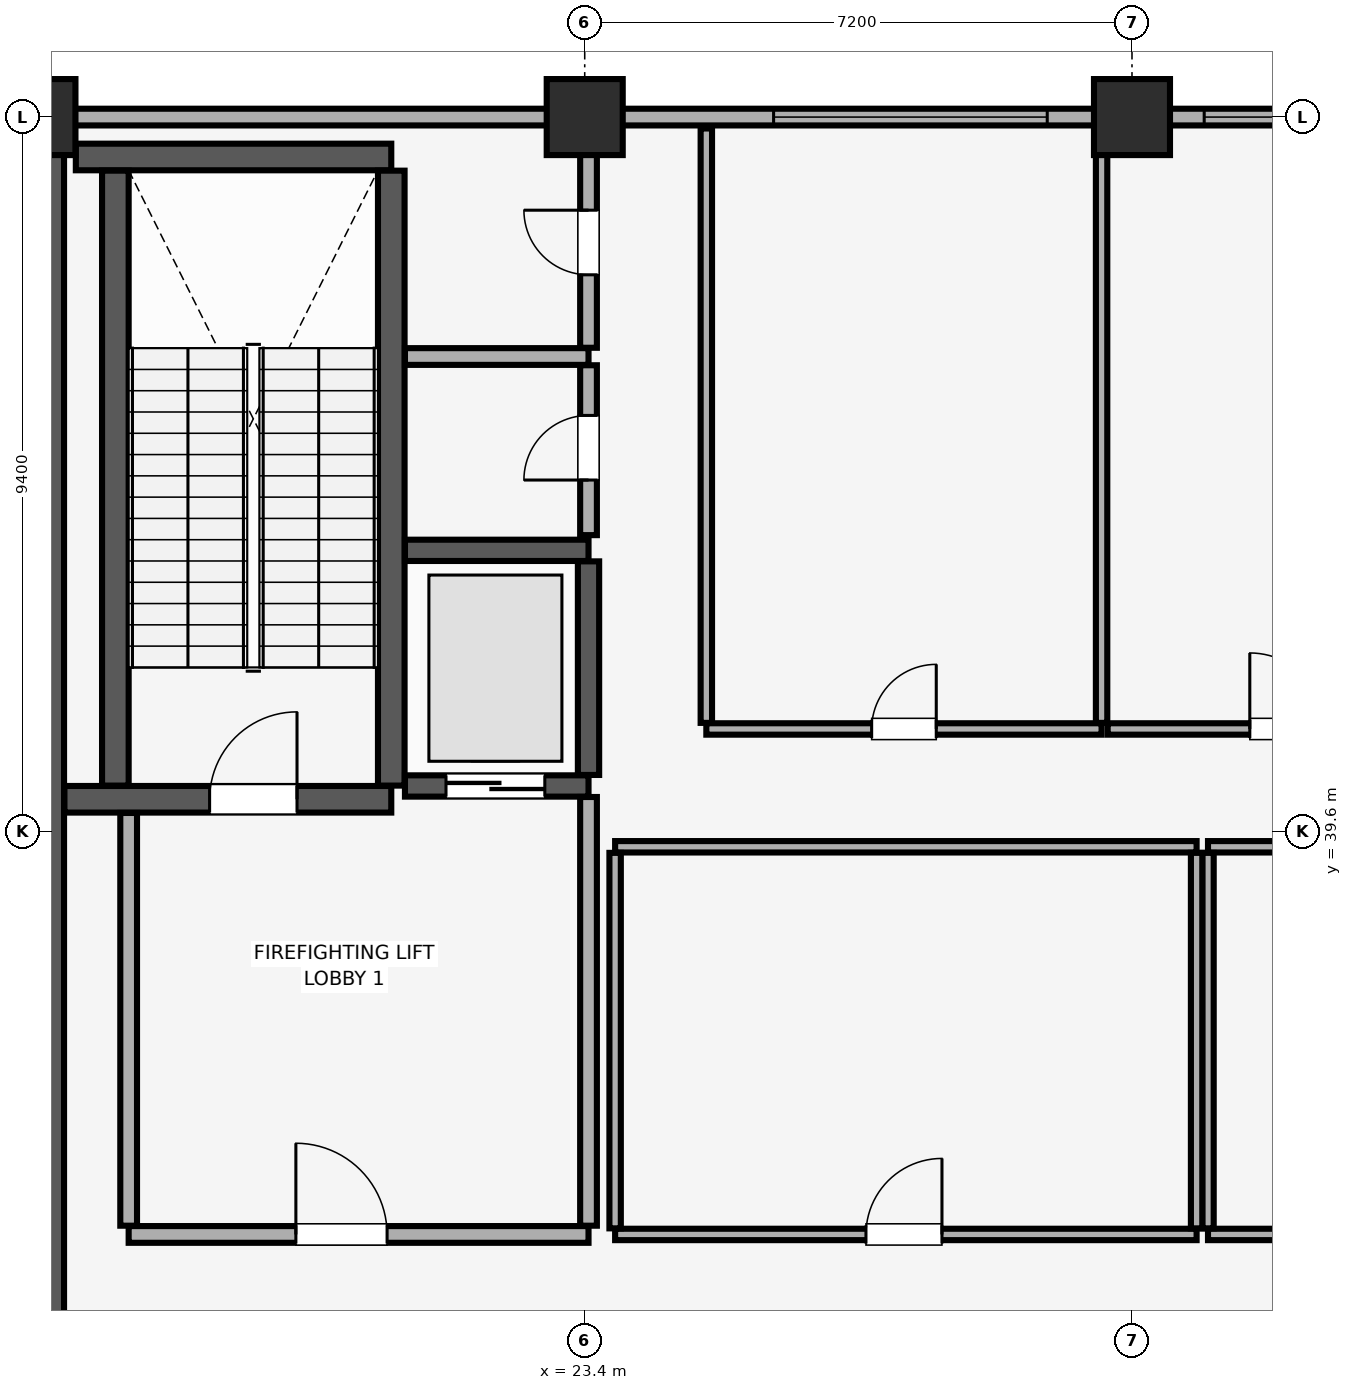
"""IFC4 building model, lengths in metres.
Left out: names, types, materials, properties, quantities, classifications, styles, units other than length and angle.
Written with IfcOpenShell. Run it as: python <this file> out.ifc"""

import sys

from ifc_helpers import new_model, si_unit, direction, frame, frame_2d, origin, origin_2d, place, context, subcontext, project, spatial, rectangle, extrude, element, fill, save


model = new_model("IFC4")
c1 = context("Model", 3, precision=1e-05, world=origin(), true_north=direction((0.0, 1.0)))
c2 = subcontext(c1, "Body", "Model", "MODEL_VIEW")
j1 = project(units=[si_unit("LENGTHUNIT", "METRE"), si_unit("PLANEANGLEUNIT", "RADIAN")], contexts=[c1])
p1 = place(None, origin())
s1 = spatial("IfcSite", under=j1, at=p1, CompositionType="ELEMENT")
p2 = place(p1, origin())
s2 = spatial("IfcBuilding", under=s1, at=p2, CompositionType="ELEMENT")
p3 = place(p2, frame((0.0, 0.0, 300.2)))
s3 = spatial("IfcBuildingStorey", under=s2, at=p3, CompositionType="ELEMENT", Elevation=300.2)
for number, where, z_axis, x_axis in (
    (1, (16.2, 49.0, 0.0), (0.0, 0.0, 1.0), (1.0, 0.0, 0.0)),
    (2, (23.4, 49.0, 0.0), (0.0, 0.0, 1.0), (1.0, 0.0, 0.0)),
    (3, (30.6, 49.0, 0.0), (0.0, 0.0, 1.0), (1.0, 0.0, 0.0)),
):
    element("IfcColumn", number, at=place(p3, frame(where, z_axis=z_axis, x_axis=x_axis)), inside=s3, PredefinedType="COLUMN", context=c2, shape_type="SweptSolid", body=[
        extrude(rectangle(XDim=1.0, YDim=1.0, at=origin_2d()), origin(), (0.0, 0.0, 1.0), 5.12),
    ])
p4 = place(p3, frame((71.4, 49.0, 0.0), z_axis=(0.0, 0.0, 1.0), x_axis=(-1.0, 0.0, 0.0)))
e4 = element("IfcWall", 4, at=p4, inside=s3, PredefinedType="SOLIDWALL", context=c2, shape_type="SweptSolid", body=[
    extrude(rectangle(XDim=58.8, YDim=0.22, at=frame_2d((29.4, 0.0))), origin(), (0.0, 0.0, 1.0), 4.32),
])
p5 = place(p4, frame((56.365, 0.0, 0.85)))
e5 = element("IfcOpeningElement", 5, at=p5, cuts=e4, PredefinedType="OPENING", context=c2, shape_type="SweptSolid", body=[
    extrude(rectangle(XDim=1.5, YDim=1.4, at=frame_2d((0.75, 0.7))), frame((0.0, 0.12, 0.0), z_axis=(0.0, -1.0, 0.0), x_axis=(1.0, 0.0, 0.0)), (0.0, 0.0, 1.0), 0.24),
])
p6 = place(p4, frame((0.935, 0.0, 0.85)))
e6 = element("IfcOpeningElement", 6, at=p6, cuts=e4, PredefinedType="OPENING", context=c2, shape_type="SweptSolid", body=[
    extrude(rectangle(XDim=1.5, YDim=1.4, at=frame_2d((0.75, 0.7))), frame((0.0, 0.12, 0.0), z_axis=(0.0, -1.0, 0.0), x_axis=(1.0, 0.0, 0.0)), (0.0, 0.0, 1.0), 0.24),
])
p7 = place(p4, frame((41.915, 0.0, 0.9)))
e7 = element("IfcOpeningElement", 7, at=p7, cuts=e4, PredefinedType="OPENING", context=c2, shape_type="SweptSolid", body=[
    extrude(rectangle(XDim=3.6, YDim=1.5, at=frame_2d((1.8, 0.75))), frame((0.0, 0.12, 0.0), z_axis=(0.0, -1.0, 0.0), x_axis=(1.0, 0.0, 0.0)), (0.0, 0.0, 1.0), 0.24),
])
p8 = place(p4, frame((36.85, 0.0, 0.9)))
e8 = element("IfcOpeningElement", 8, at=p8, cuts=e4, PredefinedType="OPENING", context=c2, shape_type="SweptSolid", body=[
    extrude(rectangle(XDim=3.0, YDim=1.5, at=frame_2d((1.5, 0.75))), frame((0.0, 0.12, 0.0), z_axis=(0.0, -1.0, 0.0), x_axis=(1.0, 0.0, 0.0)), (0.0, 0.0, 1.0), 0.24),
])
p9 = place(p4, frame((19.7, 0.0, 0.9)))
e9 = element("IfcOpeningElement", 9, at=p9, cuts=e4, PredefinedType="OPENING", context=c2, shape_type="SweptSolid", body=[
    extrude(rectangle(XDim=3.6, YDim=1.5, at=frame_2d((1.8, 0.75))), frame((0.0, 0.12, 0.0), z_axis=(0.0, -1.0, 0.0), x_axis=(1.0, 0.0, 0.0)), (0.0, 0.0, 1.0), 0.24),
])
p10 = place(p4, frame((14.635, 0.0, 0.9)))
e10 = element("IfcOpeningElement", 10, at=p10, cuts=e4, PredefinedType="OPENING", context=c2, shape_type="SweptSolid", body=[
    extrude(rectangle(XDim=2.4, YDim=1.5, at=frame_2d((1.2, 0.75))), frame((0.0, 0.12, 0.0), z_axis=(0.0, -1.0, 0.0), x_axis=(1.0, 0.0, 0.0)), (0.0, 0.0, 1.0), 0.24),
])
p11 = place(p3, frame((16.2, 29.4, 0.0), z_axis=(0.0, 0.0, 1.0), x_axis=(0.0, 1.0, 0.0)))
e11 = element("IfcWall", 11, at=p11, inside=s3, PredefinedType="SHEAR", context=c2, shape_type="SweptSolid", body=[
    extrude(rectangle(XDim=19.2, YDim=0.7, at=frame_2d((9.6, 0.0))), origin(), (0.0, 0.0, 1.0), 5.12),
])
p12 = place(p3, frame((16.555, 40.025, 0.0), z_axis=(0.0, 0.0, 1.0), x_axis=(1.0, 0.0, 0.0)))
e12 = element("IfcWall", 12, at=p12, inside=s3, PredefinedType="SHEAR", context=c2, shape_type="SweptSolid", body=[
    extrude(rectangle(XDim=4.3, YDim=0.35, at=frame_2d((2.15, 0.0))), origin(), (0.0, 0.0, 1.0), 5.12),
])
p13 = place(p12, frame((1.91, 0.0, 0.0)))
e13 = element("IfcOpeningElement", 13, at=p13, cuts=e12, PredefinedType="OPENING", context=c2, shape_type="SweptSolid", body=[
    extrude(rectangle(XDim=1.15, YDim=2.15, at=frame_2d((0.575, 1.075))), frame((0.0, 0.185, 0.0), z_axis=(0.0, -1.0, 0.0), x_axis=(1.0, 0.0, 0.0)), (0.0, 0.0, 1.0), 0.37),
])
p14 = place(p3, frame((16.705, 48.475, 0.0), z_axis=(0.0, 0.0, 1.0), x_axis=(1.0, 0.0, 0.0)))
e14 = element("IfcWall", 14, at=p14, inside=s3, PredefinedType="SHEAR", context=c2, shape_type="SweptSolid", body=[
    extrude(rectangle(XDim=4.15, YDim=0.35, at=frame_2d((2.075, 0.0))), origin(), (0.0, 0.0, 1.0), 5.12),
])
for number, where, z_axis, x_axis in (
    (15, (17.225, 40.205, 0.0), (0.0, 0.0, 1.0), (0.0, 1.0, 0.0)),
    (16, (20.855, 40.205, 0.0), (0.0, 0.0, 1.0), (0.0, 1.0, 0.0)),
):
    element("IfcWall", number, at=place(p3, frame(where, z_axis=z_axis, x_axis=x_axis)), inside=s3, PredefinedType="SHEAR", context=c2, shape_type="SweptSolid", body=[
        extrude(rectangle(XDim=8.09, YDim=0.35, at=frame_2d((4.045, 0.0))), origin(), (0.0, 0.0, 1.0), 5.12),
    ])
p15 = place(p3, frame((21.035, 40.2, 0.0), z_axis=(0.0, 0.0, 1.0), x_axis=(1.0, 0.0, 0.0)))
e17 = element("IfcWall", 17, at=p15, inside=s3, PredefinedType="SHEAR", context=c2, shape_type="SweptSolid", body=[
    extrude(rectangle(XDim=2.415, YDim=0.28, at=frame_2d((1.208, 0.0))), origin(), (0.0, 0.0, 1.0), 5.12),
])
p16 = place(p15, frame((0.54, 0.0, 0.0)))
e18 = element("IfcOpeningElement", 18, at=p16, cuts=e17, PredefinedType="OPENING", context=c2, shape_type="SweptSolid", body=[
    extrude(rectangle(XDim=1.3, YDim=2.3, at=frame_2d((0.65, 1.15))), frame((0.0, 0.15, 0.0), z_axis=(0.0, -1.0, 0.0), x_axis=(1.0, 0.0, 0.0)), (0.0, 0.0, 1.0), 0.3),
])
p17 = place(p3, frame((21.035, 43.3, 0.0), z_axis=(0.0, 0.0, 1.0), x_axis=(1.0, 0.0, 0.0)))
e19 = element("IfcWall", 19, at=p17, inside=s3, PredefinedType="SHEAR", context=c2, shape_type="SweptSolid", body=[
    extrude(rectangle(XDim=2.415, YDim=0.28, at=frame_2d((1.208, 0.0))), origin(), (0.0, 0.0, 1.0), 5.12),
])
p18 = place(p3, frame((23.45, 40.345, 0.0), z_axis=(0.0, 0.0, 1.0), x_axis=(0.0, 1.0, 0.0)))
e20 = element("IfcWall", 20, at=p18, inside=s3, PredefinedType="SHEAR", context=c2, shape_type="SweptSolid", body=[
    extrude(rectangle(XDim=2.81, YDim=0.28, at=frame_2d((1.405, 0.0))), origin(), (0.0, 0.0, 1.0), 5.12),
])
p19 = place(p3, frame((17.4, 34.3, 0.0), z_axis=(0.0, 0.0, 1.0), x_axis=(1.0, 0.0, 0.0)))
e21 = element("IfcWall", 21, at=p19, inside=s3, PredefinedType="PARTITIONING", context=c2, shape_type="SweptSolid", body=[
    extrude(rectangle(XDim=6.05, YDim=0.22, at=frame_2d((3.025, 0.0))), origin(), (0.0, 0.0, 1.0), 5.12),
])
p20 = place(p19, frame((2.2, 0.0, 0.0)))
e22 = element("IfcOpeningElement", 22, at=p20, cuts=e21, PredefinedType="OPENING", context=c2, shape_type="SweptSolid", body=[
    extrude(rectangle(XDim=1.2, YDim=2.15, at=frame_2d((0.6, 1.075))), frame((0.0, 0.12, 0.0), z_axis=(0.0, -1.0, 0.0), x_axis=(1.0, 0.0, 0.0)), (0.0, 0.0, 1.0), 0.24),
])
p21 = place(p3, frame((17.4, 34.415, 0.0), z_axis=(0.0, 0.0, 1.0), x_axis=(0.0, 1.0, 0.0)))
e23 = element("IfcWall", 23, at=p21, inside=s3, PredefinedType="PARTITIONING", context=c2, shape_type="SweptSolid", body=[
    extrude(rectangle(XDim=5.43, YDim=0.22, at=frame_2d((2.715, 0.0))), origin(), (0.0, 0.0, 1.0), 5.12),
])
p22 = place(p3, frame((23.45, 34.415, 0.0), z_axis=(0.0, 0.0, 1.0), x_axis=(0.0, 1.0, 0.0)))
e24 = element("IfcWall", 24, at=p22, inside=s3, PredefinedType="PARTITIONING", context=c2, shape_type="SweptSolid", body=[
    extrude(rectangle(XDim=5.64, YDim=0.22, at=frame_2d((2.82, 0.0))), origin(), (0.0, 0.0, 1.0), 5.12),
])
p23 = place(p3, frame((21.035, 45.85, 0.0), z_axis=(0.0, 0.0, 1.0), x_axis=(1.0, 0.0, 0.0)))
e25 = element("IfcWall", 25, at=p23, inside=s3, PredefinedType="PARTITIONING", context=c2, shape_type="SweptSolid", body=[
    extrude(rectangle(XDim=2.415, YDim=0.22, at=frame_2d((1.208, 0.0))), origin(), (0.0, 0.0, 1.0), 5.12),
])
p24 = place(p3, frame((23.45, 43.5, 0.0), z_axis=(0.0, 0.0, 1.0), x_axis=(0.0, 1.0, 0.0)))
e26 = element("IfcWall", 26, at=p24, inside=s3, PredefinedType="PARTITIONING", context=c2, shape_type="SweptSolid", body=[
    extrude(rectangle(XDim=2.235, YDim=0.22, at=frame_2d((1.118, 0.0))), origin(), (0.0, 0.0, 1.0), 5.12),
])
p25 = place(p24, frame((0.725, 0.0, 0.0)))
e27 = element("IfcOpeningElement", 27, at=p25, cuts=e26, PredefinedType="OPENING", context=c2, shape_type="SweptSolid", body=[
    extrude(rectangle(XDim=0.85, YDim=2.1, at=frame_2d((0.425, 1.05))), frame((0.0, 0.12, 0.0), z_axis=(0.0, -1.0, 0.0), x_axis=(1.0, 0.0, 0.0)), (0.0, 0.0, 1.0), 0.24),
])
p26 = place(p3, frame((23.45, 45.965, 0.0), z_axis=(0.0, 0.0, 1.0), x_axis=(0.0, 1.0, 0.0)))
e28 = element("IfcWall", 28, at=p26, inside=s3, PredefinedType="PARTITIONING", context=c2, shape_type="SweptSolid", body=[
    extrude(rectangle(XDim=2.885, YDim=0.22, at=frame_2d((1.442, 0.0))), origin(), (0.0, 0.0, 1.0), 5.12),
])
p27 = place(p26, frame((0.96, 0.0, 0.0)))
e29 = element("IfcOpeningElement", 29, at=p27, cuts=e28, PredefinedType="OPENING", context=c2, shape_type="SweptSolid", body=[
    extrude(rectangle(XDim=0.85, YDim=2.1, at=frame_2d((0.425, 1.05))), frame((0.0, 0.12, 0.0), z_axis=(0.0, -1.0, 0.0), x_axis=(1.0, 0.0, 0.0)), (0.0, 0.0, 1.0), 0.24),
])
p28 = place(p3, frame((31.6, 34.3, 0.0), z_axis=(0.0, 0.0, 1.0), x_axis=(1.0, 0.0, 0.0)))
e30 = element("IfcWall", 30, at=p28, inside=s3, PredefinedType="PARTITIONING", context=c2, shape_type="SweptSolid", body=[
    extrude(rectangle(XDim=5.2, YDim=0.15, at=frame_2d((2.6, 0.0))), origin(), (0.0, 0.0, 1.0), 5.12),
])
p29 = place(p28, frame((2.175, 0.0, 0.0)))
e31 = element("IfcOpeningElement", 31, at=p29, cuts=e30, PredefinedType="OPENING", context=c2, shape_type="SweptSolid", body=[
    extrude(rectangle(XDim=0.85, YDim=2.1, at=frame_2d((0.425, 1.05))), frame((0.0, 0.085, 0.0), z_axis=(0.0, -1.0, 0.0), x_axis=(1.0, 0.0, 0.0)), (0.0, 0.0, 1.0), 0.17),
])
p30 = place(p3, frame((31.6, 39.4, 0.0), z_axis=(0.0, 0.0, 1.0), x_axis=(1.0, 0.0, 0.0)))
e32 = element("IfcWall", 32, at=p30, inside=s3, PredefinedType="PARTITIONING", context=c2, shape_type="SweptSolid", body=[
    extrude(rectangle(XDim=5.2, YDim=0.15, at=frame_2d((2.6, 0.0))), origin(), (0.0, 0.0, 1.0), 5.12),
])
p31 = place(p3, frame((31.6, 34.38, 0.0), z_axis=(0.0, 0.0, 1.0), x_axis=(0.0, 1.0, 0.0)))
e33 = element("IfcWall", 33, at=p31, inside=s3, PredefinedType="PARTITIONING", context=c2, shape_type="SweptSolid", body=[
    extrude(rectangle(XDim=4.94, YDim=0.15, at=frame_2d((2.47, 0.0))), origin(), (0.0, 0.0, 1.0), 5.12),
])
p32 = place(p3, frame((23.8, 34.3, 0.0), z_axis=(0.0, 0.0, 1.0), x_axis=(1.0, 0.0, 0.0)))
e34 = element("IfcWall", 34, at=p32, inside=s3, PredefinedType="PARTITIONING", context=c2, shape_type="SweptSolid", body=[
    extrude(rectangle(XDim=7.65, YDim=0.15, at=frame_2d((3.825, 0.0))), origin(), (0.0, 0.0, 1.0), 5.12),
])
p33 = place(p32, frame((3.3, 0.0, 0.0)))
e35 = element("IfcOpeningElement", 35, at=p33, cuts=e34, PredefinedType="OPENING", context=c2, shape_type="SweptSolid", body=[
    extrude(rectangle(XDim=1.0, YDim=2.15, at=frame_2d((0.5, 1.075))), frame((0.0, 0.085, 0.0), z_axis=(0.0, -1.0, 0.0), x_axis=(1.0, 0.0, 0.0)), (0.0, 0.0, 1.0), 0.17),
])
p34 = place(p3, frame((23.8, 39.4, 0.0), z_axis=(0.0, 0.0, 1.0), x_axis=(1.0, 0.0, 0.0)))
e36 = element("IfcWall", 36, at=p34, inside=s3, PredefinedType="PARTITIONING", context=c2, shape_type="SweptSolid", body=[
    extrude(rectangle(XDim=7.65, YDim=0.15, at=frame_2d((3.825, 0.0))), origin(), (0.0, 0.0, 1.0), 5.12),
])
for number, where, z_axis, x_axis in (
    (37, (23.8, 34.38, 0.0), (0.0, 0.0, 1.0), (0.0, 1.0, 0.0)),
    (38, (31.45, 34.38, 0.0), (0.0, 0.0, 1.0), (0.0, 1.0, 0.0)),
):
    element("IfcWall", number, at=place(p3, frame(where, z_axis=z_axis, x_axis=x_axis)), inside=s3, PredefinedType="PARTITIONING", context=c2, shape_type="SweptSolid", body=[
        extrude(rectangle(XDim=4.94, YDim=0.15, at=frame_2d((2.47, 0.0))), origin(), (0.0, 0.0, 1.0), 5.12),
    ])
p35 = place(p3, frame((25.0, 40.95, 0.0), z_axis=(0.0, 0.0, 1.0), x_axis=(1.0, 0.0, 0.0)))
e39 = element("IfcWall", 39, at=p35, inside=s3, PredefinedType="PARTITIONING", context=c2, shape_type="SweptSolid", body=[
    extrude(rectangle(XDim=5.2, YDim=0.15, at=frame_2d((2.6, 0.0))), origin(), (0.0, 0.0, 1.0), 5.12),
])
p36 = place(p35, frame((2.175, 0.0, 0.0)))
e40 = element("IfcOpeningElement", 40, at=p36, cuts=e39, PredefinedType="OPENING", context=c2, shape_type="SweptSolid", body=[
    extrude(rectangle(XDim=0.85, YDim=2.1, at=frame_2d((0.425, 1.05))), frame((0.0, 0.085, 0.0), z_axis=(0.0, -1.0, 0.0), x_axis=(1.0, 0.0, 0.0)), (0.0, 0.0, 1.0), 0.17),
])
for number, where, z_axis, x_axis in (
    (41, (25.0, 41.03, 0.0), (0.0, 0.0, 1.0), (0.0, 1.0, 0.0)),
    (42, (30.2, 41.03, 0.0), (0.0, 0.0, 1.0), (0.0, 1.0, 0.0)),
):
    element("IfcWall", number, at=place(p3, frame(where, z_axis=z_axis, x_axis=x_axis)), inside=s3, PredefinedType="PARTITIONING", context=c2, shape_type="SweptSolid", body=[
        extrude(rectangle(XDim=7.82, YDim=0.15, at=frame_2d((3.91, 0.0))), origin(), (0.0, 0.0, 1.0), 5.12),
    ])
p37 = place(p3, frame((30.28, 40.95, 0.0), z_axis=(0.0, 0.0, 1.0), x_axis=(1.0, 0.0, 0.0)))
e43 = element("IfcWall", 43, at=p37, inside=s3, PredefinedType="PARTITIONING", context=c2, shape_type="SweptSolid", body=[
    extrude(rectangle(XDim=4.82, YDim=0.15, at=frame_2d((2.41, 0.0))), origin(), (0.0, 0.0, 1.0), 5.12),
])
p38 = place(p37, frame((1.87, 0.0, 0.0)))
e44 = element("IfcOpeningElement", 44, at=p38, cuts=e43, PredefinedType="OPENING", context=c2, shape_type="SweptSolid", body=[
    extrude(rectangle(XDim=1.0, YDim=2.15, at=frame_2d((0.5, 1.075))), frame((0.0, 0.085, 0.0), z_axis=(0.0, -1.0, 0.0), x_axis=(1.0, 0.0, 0.0)), (0.0, 0.0, 1.0), 0.17),
])
p39 = place(p7, origin())
e45 = element("IfcWindow", 45, at=p39, inside=s3, PartitioningType="SINGLE_PANEL", PredefinedType="WINDOW", context=c2, shape_type="SweptSolid", body=[
    extrude(rectangle(XDim=3.6, YDim=1.5, at=frame_2d((1.8, 0.75))), frame((0.0, 0.03, 0.0), z_axis=(0.0, -1.0, 0.0), x_axis=(1.0, 0.0, 0.0)), (0.0, 0.0, 1.0), 0.06),
])
fill(e7, e45)
p40 = place(p8, origin())
e46 = element("IfcWindow", 46, at=p40, inside=s3, PartitioningType="SINGLE_PANEL", PredefinedType="WINDOW", context=c2, shape_type="SweptSolid", body=[
    extrude(rectangle(XDim=3.0, YDim=1.5, at=frame_2d((1.5, 0.75))), frame((0.0, 0.03, 0.0), z_axis=(0.0, -1.0, 0.0), x_axis=(1.0, 0.0, 0.0)), (0.0, 0.0, 1.0), 0.06),
])
fill(e8, e46)
p41 = place(p13, origin())
e47 = element("IfcDoor", 47, at=p41, inside=s3, OperationType="SINGLE_SWING_RIGHT", PredefinedType="DOOR", context=c2, shape_type="SweptSolid", body=[
    extrude(rectangle(XDim=1.15, YDim=2.15, at=frame_2d((0.575, 1.075))), frame((0.0, 0.025, 0.0), z_axis=(0.0, -1.0, 0.0), x_axis=(1.0, 0.0, 0.0)), (0.0, 0.0, 1.0), 0.05),
])
fill(e13, e47)
p42 = place(p16, origin())
e48 = element("IfcDoor", 48, at=p42, inside=s3, OperationType="DOUBLE_DOOR_SLIDING", PredefinedType="DOOR", context=c2, shape_type="SweptSolid", body=[
    extrude(rectangle(XDim=1.3, YDim=2.3, at=frame_2d((0.65, 1.15))), frame((0.0, 0.025, 0.0), z_axis=(0.0, -1.0, 0.0), x_axis=(1.0, 0.0, 0.0)), (0.0, 0.0, 1.0), 0.05),
])
fill(e18, e48)
p43 = place(p20, origin())
e49 = element("IfcDoor", 49, at=p43, inside=s3, OperationType="SINGLE_SWING_LEFT", PredefinedType="DOOR", context=c2, shape_type="SweptSolid", body=[
    extrude(rectangle(XDim=1.2, YDim=2.15, at=frame_2d((0.6, 1.075))), frame((0.0, 0.025, 0.0), z_axis=(0.0, -1.0, 0.0), x_axis=(1.0, 0.0, 0.0)), (0.0, 0.0, 1.0), 0.05),
])
fill(e22, e49)
p44 = place(p25, origin())
e50 = element("IfcDoor", 50, at=p44, inside=s3, OperationType="SINGLE_SWING_LEFT", PredefinedType="DOOR", context=c2, shape_type="SweptSolid", body=[
    extrude(rectangle(XDim=0.85, YDim=2.1, at=frame_2d((0.425, 1.05))), frame((0.0, 0.025, 0.0), z_axis=(0.0, -1.0, 0.0), x_axis=(1.0, 0.0, 0.0)), (0.0, 0.0, 1.0), 0.05),
])
fill(e27, e50)
p45 = place(p27, origin())
e51 = element("IfcDoor", 51, at=p45, inside=s3, OperationType="SINGLE_SWING_RIGHT", PredefinedType="DOOR", context=c2, shape_type="SweptSolid", body=[
    extrude(rectangle(XDim=0.85, YDim=2.1, at=frame_2d((0.425, 1.05))), frame((0.0, 0.025, 0.0), z_axis=(0.0, -1.0, 0.0), x_axis=(1.0, 0.0, 0.0)), (0.0, 0.0, 1.0), 0.05),
])
fill(e29, e51)
p46 = place(p33, origin())
e52 = element("IfcDoor", 52, at=p46, inside=s3, OperationType="SINGLE_SWING_RIGHT", PredefinedType="DOOR", context=c2, shape_type="SweptSolid", body=[
    extrude(rectangle(XDim=1.0, YDim=2.15, at=frame_2d((0.5, 1.075))), frame((0.0, 0.025, 0.0), z_axis=(0.0, -1.0, 0.0), x_axis=(1.0, 0.0, 0.0)), (0.0, 0.0, 1.0), 0.05),
])
fill(e35, e52)
p47 = place(p36, origin())
e53 = element("IfcDoor", 53, at=p47, inside=s3, OperationType="SINGLE_SWING_RIGHT", PredefinedType="DOOR", context=c2, shape_type="SweptSolid", body=[
    extrude(rectangle(XDim=0.85, YDim=2.1, at=frame_2d((0.425, 1.05))), frame((0.0, 0.025, 0.0), z_axis=(0.0, -1.0, 0.0), x_axis=(1.0, 0.0, 0.0)), (0.0, 0.0, 1.0), 0.05),
])
fill(e40, e53)
p48 = place(p38, origin())
e54 = element("IfcDoor", 54, at=p48, inside=s3, OperationType="SINGLE_SWING_LEFT", PredefinedType="DOOR", context=c2, shape_type="SweptSolid", body=[
    extrude(rectangle(XDim=1.0, YDim=2.15, at=frame_2d((0.5, 1.075))), frame((0.0, 0.025, 0.0), z_axis=(0.0, -1.0, 0.0), x_axis=(1.0, 0.0, 0.0)), (0.0, 0.0, 1.0), 0.05),
])
fill(e44, e54)
save(model, sys.argv[1])
